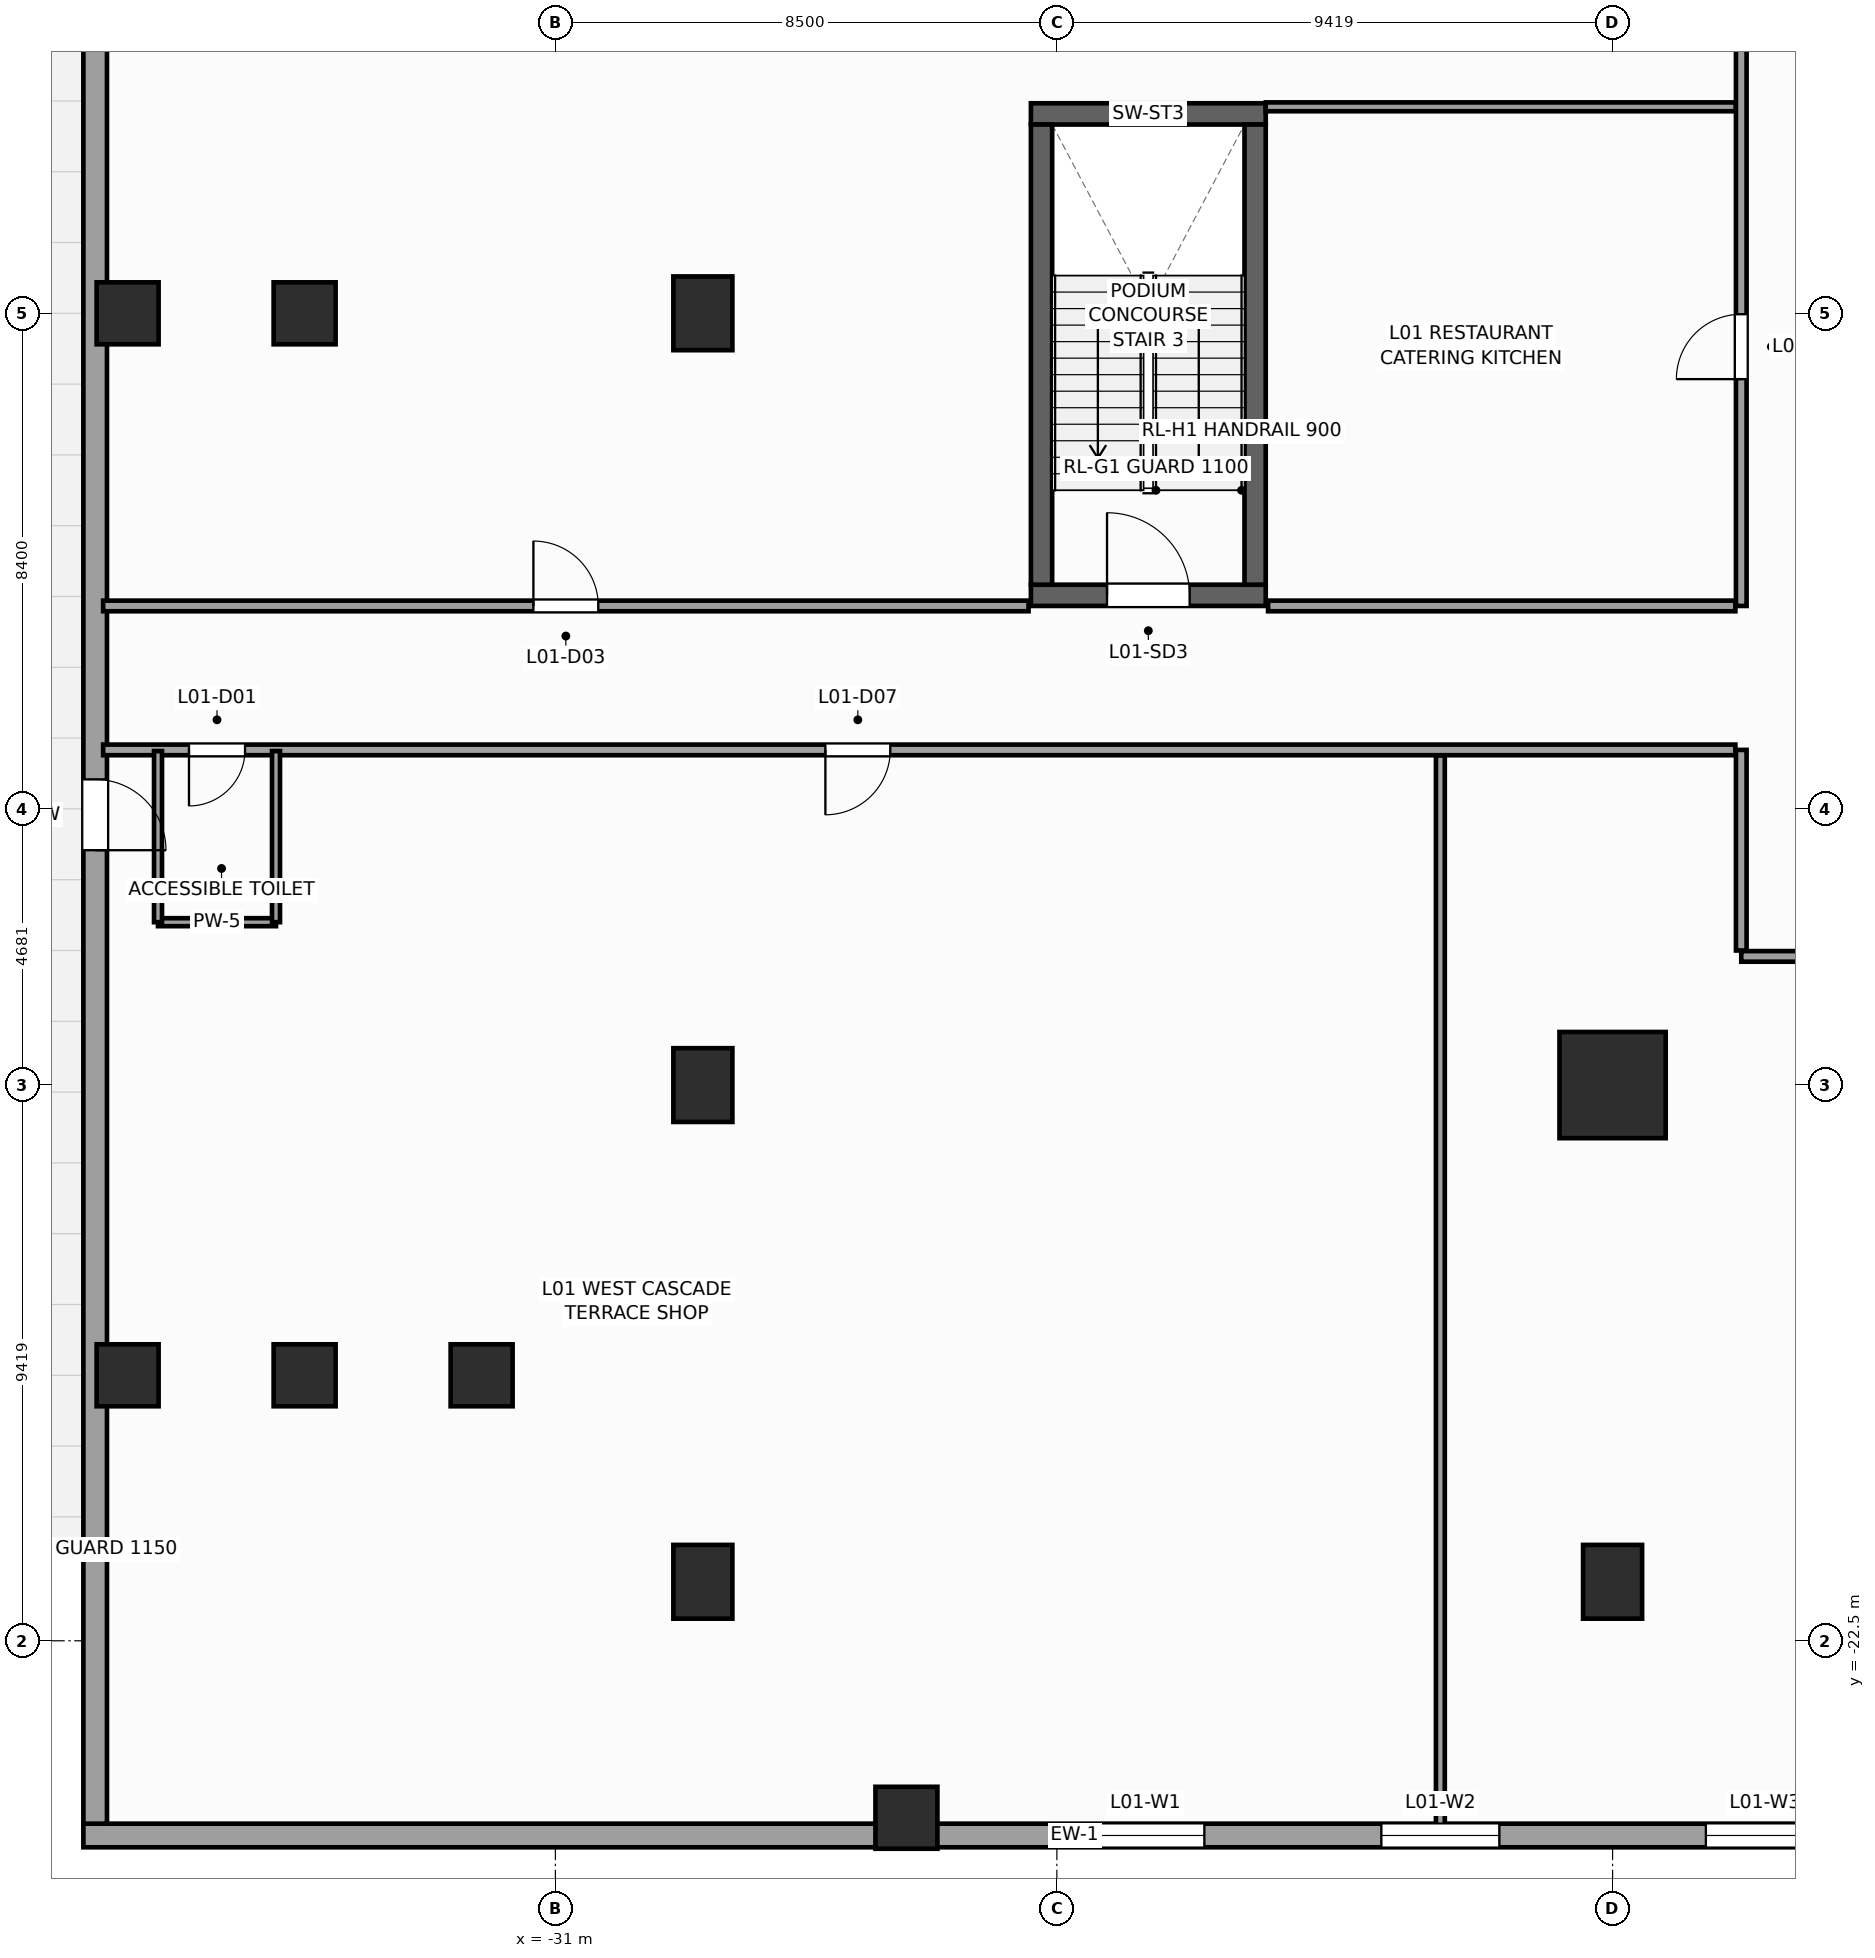
"""IFC4 building model, lengths in metres.
Left out: names, types, materials, properties, quantities, classifications, styles, units other than length and angle.
Written with IfcOpenShell. Run it as: python <this file> out.ifc"""

import sys

from ifc_helpers import new_model, si_unit, direction, frame, frame_2d, origin, origin_2d, place, context, subcontext, project, spatial, rectangle, extrude, source, transform, mapped, element, fill, save


model = new_model("IFC4")
c1 = context("Model", 3, precision=1e-05, world=origin(), true_north=direction((0.0, 1.0)))
c2 = subcontext(c1, "Body", "Model", "MODEL_VIEW")
j1 = project(units=[si_unit("LENGTHUNIT", "METRE"), si_unit("PLANEANGLEUNIT", "RADIAN")], contexts=[c1])
p1 = place(None, origin())
s1 = spatial("IfcSite", under=j1, at=p1, CompositionType="ELEMENT")
p2 = place(p1, origin())
s2 = spatial("IfcBuilding", under=s1, at=p2, CompositionType="ELEMENT")
p3 = place(p2, frame((0.0, 0.0, 6.0)))
s3 = spatial("IfcBuildingStorey", under=s2, at=p3, CompositionType="ELEMENT", Elevation=6.0)
p4 = place(p3, frame((-22.94, -4.78, 0.0), z_axis=(0.0, 0.0, 1.0), x_axis=(1.0, 0.0, 0.0)))
e1 = element("IfcWall", 1, at=p4, inside=s3, PredefinedType="SHEAR", context=c2, shape_type="SweptSolid", body=[
    extrude(rectangle(XDim=3.98, YDim=0.36, at=frame_2d((1.99, 0.0))), origin(), (0.0, 0.0, 1.0), 5.0),
])
p5 = place(p4, frame((1.29, 0.0, 0.0)))
e2 = element("IfcOpeningElement", 2, at=p5, cuts=e1, PredefinedType="OPENING", context=c2, shape_type="SweptSolid", body=[
    extrude(rectangle(XDim=1.4, YDim=2.2, at=frame_2d((0.7, 1.1))), frame((0.0, 0.19, 0.0), z_axis=(0.0, -1.0, 0.0), x_axis=(1.0, 0.0, 0.0)), (0.0, 0.0, 1.0), 0.38),
])
p6 = place(p3, frame((-22.94, 3.38, 0.0), z_axis=(0.0, 0.0, 1.0), x_axis=(1.0, 0.0, 0.0)))
e3 = element("IfcWall", 3, at=p6, inside=s3, PredefinedType="SHEAR", context=c2, shape_type="SweptSolid", body=[
    extrude(rectangle(XDim=3.98, YDim=0.36, at=frame_2d((1.99, 0.0))), origin(), (0.0, 0.0, 1.0), 5.0),
])
for number, where, z_axis, x_axis in (
    (4, (-22.76, -4.6, 0.0), (0.0, 0.0, 1.0), (0.0, 1.0, 0.0)),
    (5, (-19.14, -4.6, 0.0), (0.0, 0.0, 1.0), (0.0, 1.0, 0.0)),
):
    element("IfcWall", number, at=place(p3, frame(where, z_axis=z_axis, x_axis=x_axis)), inside=s3, PredefinedType="SHEAR", context=c2, shape_type="SweptSolid", body=[
        extrude(rectangle(XDim=7.8, YDim=0.36, at=frame_2d((3.9, 0.0))), origin(), (0.0, 0.0, 1.0), 5.0),
    ])
m1 = source(origin(), c2, "Body", "SweptSolid", [
    extrude(rectangle(XDim=1.8, YDim=1.8, at=origin_2d()), origin(), (0.0, 0.0, 1.0), 5.0),
])
p7 = place(p3, frame((-13.081, -13.081, 0.0), z_axis=(0.0, 0.0, 1.0), x_axis=(1.0, 0.0, 0.0)))
e6 = element("IfcColumn", 6, at=p7, inside=s3, PredefinedType="COLUMN", context=c2, shape_type="MappedRepresentation", body=[
    mapped(m1, transform((0.0, 0.0, 0.0), scale=1.0)),
])
m2 = source(origin(), c2, "Body", "SweptSolid", [
    extrude(rectangle(XDim=1.0, YDim=1.25, at=origin_2d()), origin(), (0.0, 0.0, 1.0), 5.0),
])
for number, where, z_axis, x_axis in (
    (7, (-28.5, -21.5, 0.0), (0.0, 0.0, 1.0), (1.0, 0.0, 0.0)),
    (8, (-13.081, -21.5, 0.0), (0.0, 0.0, 1.0), (1.0, 0.0, 0.0)),
    (9, (-28.5, -13.081, 0.0), (0.0, 0.0, 1.0), (1.0, 0.0, 0.0)),
    (10, (-28.5, 0.0, 0.0), (0.0, 0.0, 1.0), (1.0, 0.0, 0.0)),
):
    element("IfcColumn", number, at=place(p3, frame(where, z_axis=z_axis, x_axis=x_axis)), inside=s3, PredefinedType="COLUMN", context=c2, shape_type="MappedRepresentation", body=[
        mapped(m2, transform((0.0, 0.0, 0.0), scale=1.0)),
    ])
m3 = source(origin(), c2, "Body", "SweptSolid", [
    extrude(rectangle(XDim=1.05, YDim=1.05, at=origin_2d()), origin(), (0.0, 0.0, 1.0), 5.0),
])
for number, where, z_axis, x_axis in (
    (11, (-25.05, -25.5, 0.0), (0.0, 0.0, 1.0), (1.0, 0.0, 0.0)),
    (12, (-32.25, -18.0, 0.0), (0.0, 0.0, 1.0), (1.0, 0.0, 0.0)),
    (13, (-35.25, -18.0, 0.0), (0.0, 0.0, 1.0), (1.0, 0.0, 0.0)),
    (14, (-35.25, 0.0, 0.0), (0.0, 0.0, 1.0), (1.0, 0.0, 0.0)),
    (15, (-38.25, -18.0, 0.0), (0.0, 0.0, 1.0), (1.0, 0.0, 0.0)),
    (16, (-38.25, 0.0, 0.0), (0.0, 0.0, 1.0), (1.0, 0.0, 0.0)),
):
    element("IfcColumn", number, at=place(p3, frame(where, z_axis=z_axis, x_axis=x_axis)), inside=s3, PredefinedType="COLUMN", context=c2, shape_type="MappedRepresentation", body=[
        mapped(m3, transform((0.0, 0.0, 0.0), scale=1.0)),
    ])
p8 = place(p3, frame((-39.0, -25.8, 0.0), z_axis=(0.0, 0.0, 1.0), x_axis=(1.0, 0.0, 0.0)))
e17 = element("IfcWall", 17, at=p8, inside=s3, PredefinedType="STANDARD", context=c2, shape_type="SweptSolid", body=[
    extrude(rectangle(XDim=33.6, YDim=0.4, at=frame_2d((16.8, 0.0))), origin(), (0.0, 0.0, 1.0), 3.85),
])
p9 = place(p8, frame((17.0, 0.0, 0.85)))
e18 = element("IfcOpeningElement", 18, at=p9, cuts=e17, PredefinedType="OPENING", context=c2, shape_type="SweptSolid", body=[
    extrude(rectangle(XDim=2.0, YDim=2.8, at=frame_2d((1.0, 1.4))), frame((0.0, 0.21, 0.0), z_axis=(0.0, -1.0, 0.0), x_axis=(1.0, 0.0, 0.0)), (0.0, 0.0, 1.0), 0.42),
])
p10 = place(p8, frame((22.0, 0.0, 0.85)))
e19 = element("IfcOpeningElement", 19, at=p10, cuts=e17, PredefinedType="OPENING", context=c2, shape_type="SweptSolid", body=[
    extrude(rectangle(XDim=2.0, YDim=2.8, at=frame_2d((1.0, 1.4))), frame((0.0, 0.21, 0.0), z_axis=(0.0, -1.0, 0.0), x_axis=(1.0, 0.0, 0.0)), (0.0, 0.0, 1.0), 0.42),
])
p11 = place(p8, frame((27.5, 0.0, 0.85)))
e20 = element("IfcOpeningElement", 20, at=p11, cuts=e17, PredefinedType="OPENING", context=c2, shape_type="SweptSolid", body=[
    extrude(rectangle(XDim=2.0, YDim=2.8, at=frame_2d((1.0, 1.4))), frame((0.0, 0.21, 0.0), z_axis=(0.0, -1.0, 0.0), x_axis=(1.0, 0.0, 0.0)), (0.0, 0.0, 1.0), 0.42),
])
p12 = place(p3, frame((-38.8, -25.6, 0.0), z_axis=(0.0, 0.0, 1.0), x_axis=(0.0, 1.0, 0.0)))
e21 = element("IfcWall", 21, at=p12, inside=s3, PredefinedType="STANDARD", context=c2, shape_type="SweptSolid", body=[
    extrude(rectangle(XDim=51.2, YDim=0.4, at=frame_2d((25.6, 0.0))), origin(), (0.0, 0.0, 1.0), 4.66),
])
p13 = place(p12, frame((16.5, 0.0, 0.0)))
e22 = element("IfcOpeningElement", 22, at=p13, cuts=e21, PredefinedType="OPENING", context=c2, shape_type="SweptSolid", body=[
    extrude(rectangle(XDim=1.2, YDim=2.3, at=frame_2d((0.6, 1.15))), frame((0.0, 0.21, 0.0), z_axis=(0.0, -1.0, 0.0), x_axis=(1.0, 0.0, 0.0)), (0.0, 0.0, 1.0), 0.42),
])
p14 = place(p3, frame((-10.9, -10.9, 0.0), z_axis=(0.0, 0.0, 1.0), x_axis=(1.0, 0.0, 0.0)))
e23 = element("IfcWall", 23, at=p14, inside=s3, PredefinedType="PARTITIONING", context=c2, shape_type="SweptSolid", body=[
    extrude(rectangle(XDim=12.6, YDim=0.18, at=frame_2d((6.3, 0.0))), origin(), (0.0, 0.0, 1.0), 4.66),
])
p15 = place(p3, frame((-10.9, -10.8, 0.0), z_axis=(0.0, 0.0, 1.0), x_axis=(0.0, 1.0, 0.0)))
e24 = element("IfcWall", 24, at=p15, inside=s3, PredefinedType="PARTITIONING", context=c2, shape_type="SweptSolid", body=[
    extrude(rectangle(XDim=3.4, YDim=0.18, at=frame_2d((1.7, 0.0))), origin(), (0.0, 0.0, 1.0), 4.66),
])
p16 = place(p3, frame((-10.9, -4.96, 0.0), z_axis=(0.0, 0.0, 1.0), x_axis=(0.0, 1.0, 0.0)))
e25 = element("IfcWall", 25, at=p16, inside=s3, PredefinedType="PARTITIONING", context=c2, shape_type="SweptSolid", body=[
    extrude(rectangle(XDim=15.76, YDim=0.18, at=frame_2d((7.88, 0.0))), origin(), (0.0, 0.0, 1.0), 4.66),
])
p17 = place(p16, frame((3.844, 0.0, 0.0)))
e26 = element("IfcOpeningElement", 26, at=p17, cuts=e25, PredefinedType="OPENING", context=c2, shape_type="SweptSolid", body=[
    extrude(rectangle(XDim=1.1, YDim=2.2, at=frame_2d((0.55, 1.1))), frame((0.0, 0.1, 0.0), z_axis=(0.0, -1.0, 0.0), x_axis=(1.0, 0.0, 0.0)), (0.0, 0.0, 1.0), 0.2),
])
p18 = place(p3, frame((-38.665, -7.4, 0.0), z_axis=(0.0, 0.0, 1.0), x_axis=(1.0, 0.0, 0.0)))
e27 = element("IfcWall", 27, at=p18, inside=s3, PredefinedType="PARTITIONING", context=c2, shape_type="SweptSolid", body=[
    extrude(rectangle(XDim=27.665, YDim=0.18, at=frame_2d((13.833, 0.0))), origin(), (0.0, 0.0, 1.0), 4.66),
])
p19 = place(p18, frame((1.455, 0.0, 0.0)))
e28 = element("IfcOpeningElement", 28, at=p19, cuts=e27, PredefinedType="OPENING", context=c2, shape_type="SweptSolid", body=[
    extrude(rectangle(XDim=0.95, YDim=2.1, at=frame_2d((0.475, 1.05))), frame((0.0, 0.1, 0.0), z_axis=(0.0, -1.0, 0.0), x_axis=(1.0, 0.0, 0.0)), (0.0, 0.0, 1.0), 0.2),
])
p20 = place(p18, frame((12.241, 0.0, 0.0)))
e29 = element("IfcOpeningElement", 29, at=p20, cuts=e27, PredefinedType="OPENING", context=c2, shape_type="SweptSolid", body=[
    extrude(rectangle(XDim=1.1, YDim=2.2, at=frame_2d((0.55, 1.1))), frame((0.0, 0.1, 0.0), z_axis=(0.0, -1.0, 0.0), x_axis=(1.0, 0.0, 0.0)), (0.0, 0.0, 1.0), 0.2),
])
p21 = place(p3, frame((-38.665, -4.96, 0.0), z_axis=(0.0, 0.0, 1.0), x_axis=(1.0, 0.0, 0.0)))
e30 = element("IfcWall", 30, at=p21, inside=s3, PredefinedType="PARTITIONING", context=c2, shape_type="SweptSolid", body=[
    extrude(rectangle(XDim=15.685, YDim=0.18, at=frame_2d((7.843, 0.0))), origin(), (0.0, 0.0, 1.0), 4.66),
])
p22 = place(p21, frame((7.292, 0.0, 0.0)))
e31 = element("IfcOpeningElement", 31, at=p22, cuts=e30, PredefinedType="OPENING", context=c2, shape_type="SweptSolid", body=[
    extrude(rectangle(XDim=1.1, YDim=2.2, at=frame_2d((0.55, 1.1))), frame((0.0, 0.1, 0.0), z_axis=(0.0, -1.0, 0.0), x_axis=(1.0, 0.0, 0.0)), (0.0, 0.0, 1.0), 0.2),
])
p23 = place(p3, frame((-18.92, -4.96, 0.0), z_axis=(0.0, 0.0, 1.0), x_axis=(1.0, 0.0, 0.0)))
e32 = element("IfcWall", 32, at=p23, inside=s3, PredefinedType="PARTITIONING", context=c2, shape_type="SweptSolid", body=[
    extrude(rectangle(XDim=7.92, YDim=0.18, at=frame_2d((3.96, 0.0))), origin(), (0.0, 0.0, 1.0), 4.66),
])
p24 = place(p3, frame((-18.96, 3.5, 0.0), z_axis=(0.0, 0.0, 1.0), x_axis=(1.0, 0.0, 0.0)))
e33 = element("IfcWall", 33, at=p24, inside=s3, PredefinedType="PARTITIONING", context=c2, shape_type="SweptSolid", body=[
    extrude(rectangle(XDim=7.965, YDim=0.15, at=frame_2d((3.982, 0.0))), origin(), (0.0, 0.0, 1.0), 4.66),
])
p25 = place(p3, frame((-16.0, -25.665, 0.0), z_axis=(0.0, 0.0, 1.0), x_axis=(0.0, 1.0, 0.0)))
e34 = element("IfcWall", 34, at=p25, inside=s3, PredefinedType="PARTITIONING", context=c2, shape_type="SweptSolid", body=[
    extrude(rectangle(XDim=18.17, YDim=0.15, at=frame_2d((9.085, 0.0))), origin(), (0.0, 0.0, 1.0), 4.66),
])
p26 = place(p3, frame((-37.735, -10.32, 0.0), z_axis=(0.0, 0.0, 1.0), x_axis=(1.0, 0.0, 0.0)))
e35 = element("IfcWall", 35, at=p26, inside=s3, PredefinedType="PARTITIONING", context=c2, shape_type="SweptSolid", body=[
    extrude(rectangle(XDim=2.0, YDim=0.135, at=frame_2d((1.0, 0.0))), origin(), (0.0, 0.0, 1.0), 4.66),
])
for number, where, z_axis, x_axis in (
    (36, (-35.735, -10.32, 0.0), (0.0, 0.0, 1.0), (0.0, 1.0, 0.0)),
    (37, (-37.735, -10.32, 0.0), (0.0, 0.0, 1.0), (0.0, 1.0, 0.0)),
):
    element("IfcWall", number, at=place(p3, frame(where, z_axis=z_axis, x_axis=x_axis)), inside=s3, PredefinedType="PARTITIONING", context=c2, shape_type="SweptSolid", body=[
        extrude(rectangle(XDim=2.9, YDim=0.135, at=frame_2d((1.45, 0.0))), origin(), (0.0, 0.0, 1.0), 4.66),
    ])
m4 = source(origin(), c2, "Body", "SweptSolid", [
    extrude(rectangle(XDim=2.0, YDim=2.8, at=frame_2d((1.0, 1.4))), frame((0.0, 0.03, 0.0), z_axis=(0.0, -1.0, 0.0), x_axis=(1.0, 0.0, 0.0)), (0.0, 0.0, 1.0), 0.06),
])
p27 = place(p9, origin())
e38 = element("IfcWindow", 38, at=p27, inside=s3, PartitioningType="SINGLE_PANEL", PredefinedType="WINDOW", context=c2, shape_type="MappedRepresentation", body=[
    mapped(m4, transform((0.0, 0.0, 0.0), scale=1.0)),
])
fill(e18, e38)
p28 = place(p10, origin())
e39 = element("IfcWindow", 39, at=p28, inside=s3, PartitioningType="SINGLE_PANEL", PredefinedType="WINDOW", context=c2, shape_type="MappedRepresentation", body=[
    mapped(m4, transform((0.0, 0.0, 0.0), scale=1.0)),
])
fill(e19, e39)
p29 = place(p11, origin())
e40 = element("IfcWindow", 40, at=p29, inside=s3, PartitioningType="SINGLE_PANEL", PredefinedType="WINDOW", context=c2, shape_type="MappedRepresentation", body=[
    mapped(m4, transform((0.0, 0.0, 0.0), scale=1.0)),
])
fill(e20, e40)
m5 = source(origin(), c2, "Body", "SweptSolid", [
    extrude(rectangle(XDim=1.2, YDim=2.3, at=frame_2d((0.6, 1.15))), frame((0.0, 0.025, 0.0), z_axis=(0.0, -1.0, 0.0), x_axis=(1.0, 0.0, 0.0)), (0.0, 0.0, 1.0), 0.05),
])
p30 = place(p13, frame((1.2, 0.0, 0.0), z_axis=(0.0, 0.0, 1.0), x_axis=(-1.0, 0.0, 0.0)))
e41 = element("IfcDoor", 41, at=p30, inside=s3, OperationType="SINGLE_SWING_LEFT", PredefinedType="DOOR", context=c2, shape_type="MappedRepresentation", body=[
    mapped(m5, transform((0.0, 0.0, 0.0), scale=1.0)),
])
fill(e22, e41)
m6 = source(origin(), c2, "Body", "SweptSolid", [
    extrude(rectangle(XDim=1.4, YDim=2.2, at=frame_2d((0.7, 1.1))), frame((0.0, 0.025, 0.0), z_axis=(0.0, -1.0, 0.0), x_axis=(1.0, 0.0, 0.0)), (0.0, 0.0, 1.0), 0.05),
])
p31 = place(p5, origin())
e42 = element("IfcDoor", 42, at=p31, inside=s3, OperationType="SINGLE_SWING_LEFT", PredefinedType="DOOR", context=c2, shape_type="MappedRepresentation", body=[
    mapped(m6, transform((0.0, 0.0, 0.0), scale=1.0)),
])
fill(e2, e42)
m7 = source(origin(), c2, "Body", "SweptSolid", [
    extrude(rectangle(XDim=0.95, YDim=2.1, at=frame_2d((0.475, 1.05))), frame((0.0, 0.025, 0.0), z_axis=(0.0, -1.0, 0.0), x_axis=(1.0, 0.0, 0.0)), (0.0, 0.0, 1.0), 0.05),
])
p32 = place(p19, frame((0.95, 0.0, 0.0), z_axis=(0.0, 0.0, 1.0), x_axis=(-1.0, 0.0, 0.0)))
e43 = element("IfcDoor", 43, at=p32, inside=s3, OperationType="SINGLE_SWING_LEFT", PredefinedType="DOOR", context=c2, shape_type="MappedRepresentation", body=[
    mapped(m7, transform((0.0, 0.0, 0.0), scale=1.0)),
])
fill(e28, e43)
m8 = source(origin(), c2, "Body", "SweptSolid", [
    extrude(rectangle(XDim=1.1, YDim=2.2, at=frame_2d((0.55, 1.1))), frame((0.0, 0.025, 0.0), z_axis=(0.0, -1.0, 0.0), x_axis=(1.0, 0.0, 0.0)), (0.0, 0.0, 1.0), 0.05),
])
p33 = place(p22, origin())
e44 = element("IfcDoor", 44, at=p33, inside=s3, OperationType="SINGLE_SWING_LEFT", PredefinedType="DOOR", context=c2, shape_type="MappedRepresentation", body=[
    mapped(m8, transform((0.0, 0.0, 0.0), scale=1.0)),
])
fill(e31, e44)
p34 = place(p17, origin())
e45 = element("IfcDoor", 45, at=p34, inside=s3, OperationType="SINGLE_SWING_LEFT", PredefinedType="DOOR", context=c2, shape_type="MappedRepresentation", body=[
    mapped(m8, transform((0.0, 0.0, 0.0), scale=1.0)),
])
fill(e26, e45)
p35 = place(p20, frame((1.1, 0.0, 0.0), z_axis=(0.0, 0.0, 1.0), x_axis=(-1.0, 0.0, 0.0)))
e46 = element("IfcDoor", 46, at=p35, inside=s3, OperationType="SINGLE_SWING_LEFT", PredefinedType="DOOR", context=c2, shape_type="MappedRepresentation", body=[
    mapped(m8, transform((0.0, 0.0, 0.0), scale=1.0)),
])
fill(e29, e46)
save(model, sys.argv[1])
